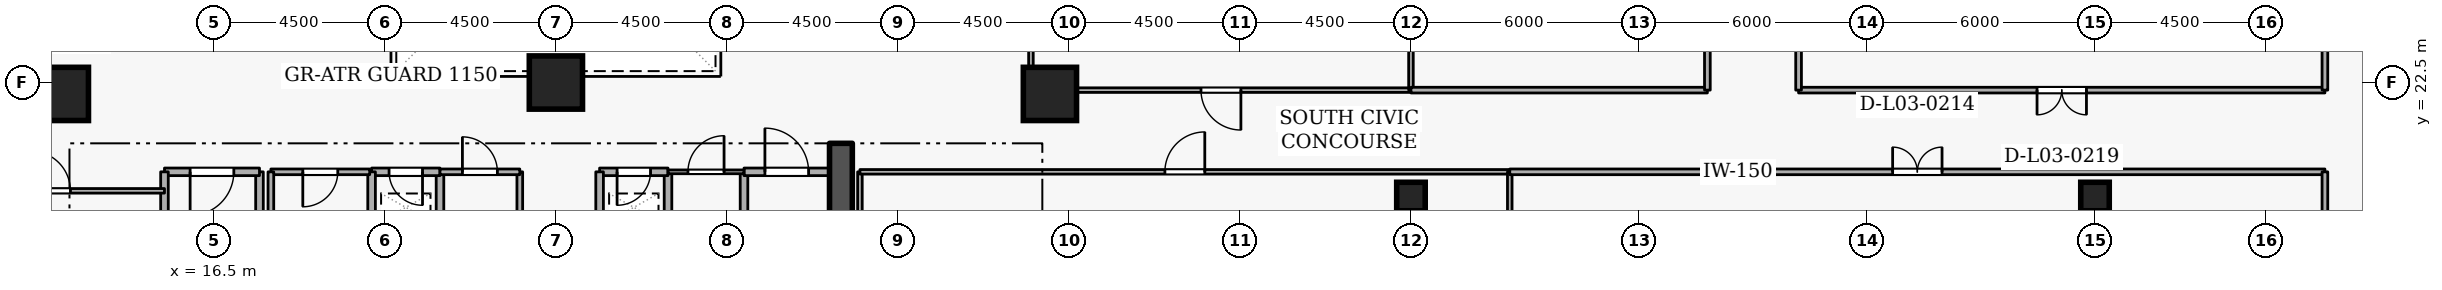
"""IFC4 building model, lengths in metres.
Left out: names, types, materials, properties, quantities, classifications, styles, units other than length and angle.
Written with IfcOpenShell. Run it as: python <this file> out.ifc"""

import sys

from ifc_helpers import new_model, si_unit, direction, frame, frame_2d, origin, origin_2d, place, context, subcontext, project, spatial, rectangle, extrude, element, fill, save


model = new_model("IFC4")
c1 = context("Model", 3, precision=1e-05, world=origin(), true_north=direction((0.0, 1.0)))
c2 = subcontext(c1, "Body", "Model", "MODEL_VIEW")
j1 = project(units=[si_unit("LENGTHUNIT", "METRE"), si_unit("PLANEANGLEUNIT", "RADIAN")], contexts=[c1])
p1 = place(None, origin())
s1 = spatial("IfcSite", under=j1, at=p1, CompositionType="ELEMENT")
p2 = place(p1, origin())
s2 = spatial("IfcBuilding", under=s1, at=p2, CompositionType="ELEMENT")
p3 = place(p2, frame((0.0, 0.0, 14.1)))
s3 = spatial("IfcBuildingStorey", under=s2, at=p3, CompositionType="ELEMENT", Elevation=14.1)
p4 = place(p3, frame((33.0, 15.2, 0.0), z_axis=(0.0, 0.0, 1.0), x_axis=(0.0, 1.0, 0.0)))
e1 = element("IfcWall", 1, at=p4, inside=s3, PredefinedType="SHEAR", context=c2, shape_type="SweptSolid", body=[
    extrude(rectangle(XDim=5.7, YDim=0.6, at=frame_2d((2.85, 0.0))), origin(), (0.0, 0.0, 1.0), 4.5),
])
for number, where, z_axis, x_axis in (
    (2, (12.5, 22.2, 0.0), (0.0, 0.0, 1.0), (1.0, 0.0, 0.0)),
    (3, (38.5, 22.2, 0.0), (0.0, 0.0, 1.0), (1.0, 0.0, 0.0)),
    (4, (25.5, 22.5, 0.0), (0.0, 0.0, 1.0), (1.0, 0.0, 0.0)),
):
    element("IfcColumn", number, at=place(p3, frame(where, z_axis=z_axis, x_axis=x_axis)), inside=s3, PredefinedType="COLUMN", context=c2, shape_type="SweptSolid", body=[
        extrude(rectangle(XDim=1.4, YDim=1.4, at=origin_2d()), origin(), (0.0, 0.0, 1.0), 4.5),
    ])
for number, where, z_axis, x_axis in (
    (5, (48.0, 19.5, 0.0), (0.0, 0.0, 1.0), (1.0, 0.0, 0.0)),
    (6, (66.0, 19.5, 0.0), (0.0, 0.0, 1.0), (1.0, 0.0, 0.0)),
):
    element("IfcColumn", number, at=place(p3, frame(where, z_axis=z_axis, x_axis=x_axis)), inside=s3, PredefinedType="COLUMN", context=c2, shape_type="SweptSolid", body=[
        extrude(rectangle(XDim=0.75, YDim=0.75, at=origin_2d()), origin(), (0.0, 0.0, 1.0), 4.5),
    ])
p5 = place(p3, frame((17.7, 18.4, 0.0), z_axis=(0.0, 0.0, 1.0), x_axis=(0.0, 1.0, 0.0)))
e7 = element("IfcWall", 7, at=p5, inside=s3, PredefinedType="STANDARD", context=c2, shape_type="SweptSolid", body=[
    extrude(rectangle(XDim=1.75, YDim=0.2, at=frame_2d((0.875, 0.0))), origin(), (0.0, 0.0, 1.0), 3.365),
])
p6 = place(p3, frame((17.7, 20.15, 0.0), z_axis=(0.0, 0.0, 1.0), x_axis=(-1.0, 0.0, 0.0)))
e8 = element("IfcWall", 8, at=p6, inside=s3, PredefinedType="STANDARD", context=c2, shape_type="SweptSolid", body=[
    extrude(rectangle(XDim=2.5, YDim=0.2, at=frame_2d((1.25, 0.0))), origin(), (0.0, 0.0, 1.0), 4.16),
])
p7 = place(p6, frame((0.675, 0.0, 0.0)))
e9 = element("IfcOpeningElement", 9, at=p7, cuts=e8, PredefinedType="OPENING", context=c2, shape_type="SweptSolid", body=[
    extrude(rectangle(XDim=1.15, YDim=2.1, at=frame_2d((0.575, 1.05))), frame((0.0, 0.11, 0.0), z_axis=(0.0, -1.0, 0.0), x_axis=(1.0, 0.0, 0.0)), (0.0, 0.0, 1.0), 0.22),
])
p8 = place(p3, frame((15.2, 20.15, 0.0), z_axis=(0.0, 0.0, 1.0), x_axis=(0.0, -1.0, 0.0)))
e10 = element("IfcWall", 10, at=p8, inside=s3, PredefinedType="STANDARD", context=c2, shape_type="SweptSolid", body=[
    extrude(rectangle(XDim=5.15, YDim=0.2, at=frame_2d((2.575, 0.0))), origin(), (0.0, 0.0, 1.0), 4.16),
])
p9 = place(p3, frame((28.45, 18.65, 0.0), z_axis=(0.0, 0.0, 1.0), x_axis=(0.0, 1.0, 0.0)))
e11 = element("IfcWall", 11, at=p9, inside=s3, PredefinedType="STANDARD", context=c2, shape_type="SweptSolid", body=[
    extrude(rectangle(XDim=1.5, YDim=0.2, at=frame_2d((0.75, 0.0))), origin(), (0.0, 0.0, 1.0), 4.16),
])
p10 = place(p3, frame((28.45, 20.15, 0.0), z_axis=(0.0, 0.0, 1.0), x_axis=(-1.0, 0.0, 0.0)))
e12 = element("IfcWall", 12, at=p10, inside=s3, PredefinedType="STANDARD", context=c2, shape_type="SweptSolid", body=[
    extrude(rectangle(XDim=1.8, YDim=0.2, at=frame_2d((0.9, 0.0))), origin(), (0.0, 0.0, 1.0), 4.16),
])
p11 = place(p10, frame((0.46, 0.0, 0.0)))
e13 = element("IfcOpeningElement", 13, at=p11, cuts=e12, PredefinedType="OPENING", context=c2, shape_type="SweptSolid", body=[
    extrude(rectangle(XDim=0.88, YDim=2.04, at=frame_2d((0.44, 1.02))), frame((0.0, 0.11, 0.0), z_axis=(0.0, -1.0, 0.0), x_axis=(1.0, 0.0, 0.0)), (0.0, 0.0, 1.0), 0.22),
])
for number, where, z_axis, x_axis in (
    (14, (26.65, 20.15, 0.0), (0.0, 0.0, 1.0), (0.0, -1.0, 0.0)),
    (15, (22.45, 18.65, 0.0), (0.0, 0.0, 1.0), (0.0, 1.0, 0.0)),
):
    element("IfcWall", number, at=place(p3, frame(where, z_axis=z_axis, x_axis=x_axis)), inside=s3, PredefinedType="STANDARD", context=c2, shape_type="SweptSolid", body=[
        extrude(rectangle(XDim=1.5, YDim=0.2, at=frame_2d((0.75, 0.0))), origin(), (0.0, 0.0, 1.0), 4.16),
    ])
p12 = place(p3, frame((22.45, 20.15, 0.0), z_axis=(0.0, 0.0, 1.0), x_axis=(-1.0, 0.0, 0.0)))
e16 = element("IfcWall", 16, at=p12, inside=s3, PredefinedType="STANDARD", context=c2, shape_type="SweptSolid", body=[
    extrude(rectangle(XDim=1.8, YDim=0.2, at=frame_2d((0.9, 0.0))), origin(), (0.0, 0.0, 1.0), 4.16),
])
p13 = place(p12, frame((0.46, 0.0, 0.0)))
e17 = element("IfcOpeningElement", 17, at=p13, cuts=e16, PredefinedType="OPENING", context=c2, shape_type="SweptSolid", body=[
    extrude(rectangle(XDim=0.88, YDim=2.04, at=frame_2d((0.44, 1.02))), frame((0.0, 0.11, 0.0), z_axis=(0.0, -1.0, 0.0), x_axis=(1.0, 0.0, 0.0)), (0.0, 0.0, 1.0), 0.22),
])
for number, where, z_axis, x_axis in (
    (18, (20.65, 20.15, 0.0), (0.0, 0.0, 1.0), (0.0, -1.0, 0.0)),
    (19, (30.45, 18.65, 0.0), (0.0, 0.0, 1.0), (0.0, 1.0, 0.0)),
):
    element("IfcWall", number, at=place(p3, frame(where, z_axis=z_axis, x_axis=x_axis)), inside=s3, PredefinedType="STANDARD", context=c2, shape_type="SweptSolid", body=[
        extrude(rectangle(XDim=1.5, YDim=0.2, at=frame_2d((0.75, 0.0))), origin(), (0.0, 0.0, 1.0), 4.16),
    ])
p14 = place(p3, frame((30.45, 20.15, 0.0), z_axis=(0.0, 0.0, 1.0), x_axis=(1.0, 0.0, 0.0)))
e20 = element("IfcWall", 20, at=p14, inside=s3, PredefinedType="STANDARD", context=c2, shape_type="SweptSolid", body=[
    extrude(rectangle(XDim=2.25, YDim=0.2, at=frame_2d((1.125, 0.0))), origin(), (0.0, 0.0, 1.0), 4.16),
])
p15 = place(p14, frame((0.55, 0.0, 0.0)))
e21 = element("IfcOpeningElement", 21, at=p15, cuts=e20, PredefinedType="OPENING", context=c2, shape_type="SweptSolid", body=[
    extrude(rectangle(XDim=1.15, YDim=2.1, at=frame_2d((0.575, 1.05))), frame((0.0, 0.11, 0.0), z_axis=(0.0, -1.0, 0.0), x_axis=(1.0, 0.0, 0.0)), (0.0, 0.0, 1.0), 0.22),
])
p16 = place(p3, frame((20.6, 20.15, 0.0), z_axis=(0.0, 0.0, 1.0), x_axis=(-1.0, 0.0, 0.0)))
e22 = element("IfcWall", 22, at=p16, inside=s3, PredefinedType="PARTITIONING", context=c2, shape_type="SweptSolid", body=[
    extrude(rectangle(XDim=2.6, YDim=0.15, at=frame_2d((1.3, 0.0))), origin(), (0.0, 0.0, 1.0), 4.16),
])
p17 = place(p16, frame((0.84, 0.0, 0.0)))
e23 = element("IfcOpeningElement", 23, at=p17, cuts=e22, PredefinedType="OPENING", context=c2, shape_type="SweptSolid", body=[
    extrude(rectangle(XDim=0.92, YDim=2.08, at=frame_2d((0.46, 1.04))), frame((0.0, 0.085, 0.0), z_axis=(0.0, -1.0, 0.0), x_axis=(1.0, 0.0, 0.0)), (0.0, 0.0, 1.0), 0.17),
])
p18 = place(p3, frame((18.0, 20.15, 0.0), z_axis=(0.0, 0.0, 1.0), x_axis=(0.0, -1.0, 0.0)))
e24 = element("IfcWall", 24, at=p18, inside=s3, PredefinedType="PARTITIONING", context=c2, shape_type="SweptSolid", body=[
    extrude(rectangle(XDim=1.5, YDim=0.15, at=frame_2d((0.75, 0.0))), origin(), (0.0, 0.0, 1.0), 3.365),
])
p19 = place(p3, frame((24.55, 20.15, 0.0), z_axis=(0.0, 0.0, 1.0), x_axis=(0.0, -1.0, 0.0)))
e25 = element("IfcWall", 25, at=p19, inside=s3, PredefinedType="PARTITIONING", context=c2, shape_type="SweptSolid", body=[
    extrude(rectangle(XDim=1.5, YDim=0.15, at=frame_2d((0.75, 0.0))), origin(), (0.0, 0.0, 1.0), 4.16),
])
p20 = place(p3, frame((22.45, 20.15, 0.0), z_axis=(0.0, 0.0, 1.0), x_axis=(1.0, 0.0, 0.0)))
e26 = element("IfcWall", 26, at=p20, inside=s3, PredefinedType="PARTITIONING", context=c2, shape_type="SweptSolid", body=[
    extrude(rectangle(XDim=2.1, YDim=0.15, at=frame_2d((1.05, 0.0))), origin(), (0.0, 0.0, 1.0), 4.16),
])
p21 = place(p20, frame((0.59, 0.0, 0.0)))
e27 = element("IfcOpeningElement", 27, at=p21, cuts=e26, PredefinedType="OPENING", context=c2, shape_type="SweptSolid", body=[
    extrude(rectangle(XDim=0.92, YDim=2.08, at=frame_2d((0.46, 1.04))), frame((0.0, 0.085, 0.0), z_axis=(0.0, -1.0, 0.0), x_axis=(1.0, 0.0, 0.0)), (0.0, 0.0, 1.0), 0.17),
])
p22 = place(p3, frame((28.45, 20.15, 0.0), z_axis=(0.0, 0.0, 1.0), x_axis=(1.0, 0.0, 0.0)))
e28 = element("IfcWall", 28, at=p22, inside=s3, PredefinedType="PARTITIONING", context=c2, shape_type="SweptSolid", body=[
    extrude(rectangle(XDim=2.0, YDim=0.1, at=frame_2d((1.0, 0.0))), origin(), (0.0, 0.0, 1.0), 4.16),
])
p23 = place(p22, frame((0.525, 0.0, 0.0)))
e29 = element("IfcOpeningElement", 29, at=p23, cuts=e28, PredefinedType="OPENING", context=c2, shape_type="SweptSolid", body=[
    extrude(rectangle(XDim=0.95, YDim=2.1, at=frame_2d((0.475, 1.05))), frame((0.0, 0.06, 0.0), z_axis=(0.0, -1.0, 0.0), x_axis=(1.0, 0.0, 0.0)), (0.0, 0.0, 1.0), 0.12),
])
p24 = place(p3, frame((9.2, 19.65, 0.0), z_axis=(0.0, 0.0, 1.0), x_axis=(1.0, 0.0, 0.0)))
e30 = element("IfcWall", 30, at=p24, inside=s3, PredefinedType="PARTITIONING", context=c2, shape_type="SweptSolid", body=[
    extrude(rectangle(XDim=6.0, YDim=0.12, at=frame_2d((3.0, 0.0))), origin(), (0.0, 0.0, 1.0), 4.16),
])
p25 = place(p24, frame((2.475, 0.0, 0.0)))
e31 = element("IfcOpeningElement", 31, at=p25, cuts=e30, PredefinedType="OPENING", context=c2, shape_type="SweptSolid", body=[
    extrude(rectangle(XDim=1.05, YDim=2.1, at=frame_2d((0.525, 1.05))), frame((0.0, 0.07, 0.0), z_axis=(0.0, -1.0, 0.0), x_axis=(1.0, 0.0, 0.0)), (0.0, 0.0, 1.0), 0.14),
])
p26 = place(p3, frame((33.5, 17.648, 0.0), z_axis=(0.0, 0.0, 1.0), x_axis=(0.0, 1.0, 0.0)))
e32 = element("IfcWall", 32, at=p26, inside=s3, PredefinedType="PARTITIONING", context=c2, shape_type="SweptSolid", body=[
    extrude(rectangle(XDim=2.502, YDim=0.12, at=frame_2d((1.251, 0.0))), origin(), (0.0, 0.0, 1.0), 4.16),
])
p27 = place(p3, frame((33.5, 20.15, 0.0), z_axis=(0.0, 0.0, 1.0), x_axis=(1.0, 0.0, 0.0)))
e33 = element("IfcWall", 33, at=p27, inside=s3, PredefinedType="PARTITIONING", context=c2, shape_type="SweptSolid", body=[
    extrude(rectangle(XDim=17.1, YDim=0.12, at=frame_2d((8.55, 0.0))), origin(), (0.0, 0.0, 1.0), 4.16),
])
p28 = place(p27, frame((8.025, 0.0, 0.0)))
e34 = element("IfcOpeningElement", 34, at=p28, cuts=e33, PredefinedType="OPENING", context=c2, shape_type="SweptSolid", body=[
    extrude(rectangle(XDim=1.05, YDim=2.1, at=frame_2d((0.525, 1.05))), frame((0.0, 0.07, 0.0), z_axis=(0.0, -1.0, 0.0), x_axis=(1.0, 0.0, 0.0)), (0.0, 0.0, 1.0), 0.14),
])
p29 = place(p3, frame((50.6, 20.15, 0.0), z_axis=(0.0, 0.0, 1.0), x_axis=(0.0, -1.0, 0.0)))
e35 = element("IfcWall", 35, at=p29, inside=s3, PredefinedType="PARTITIONING", context=c2, shape_type="SweptSolid", body=[
    extrude(rectangle(XDim=10.83, YDim=0.12, at=frame_2d((5.415, 0.0))), origin(), (0.0, 0.0, 1.0), 4.16),
])
p30 = place(p3, frame((50.6, 20.15, 0.0), z_axis=(0.0, 0.0, 1.0), x_axis=(1.0, 0.0, 0.0)))
e36 = element("IfcWall", 36, at=p30, inside=s3, PredefinedType="PARTITIONING", context=c2, shape_type="SweptSolid", body=[
    extrude(rectangle(XDim=21.45, YDim=0.15, at=frame_2d((10.725, 0.0))), origin(), (0.0, 0.0, 1.0), 4.16),
])
p31 = place(p30, frame((10.075, 0.0, 0.0)))
e37 = element("IfcOpeningElement", 37, at=p31, cuts=e36, PredefinedType="OPENING", context=c2, shape_type="SweptSolid", body=[
    extrude(rectangle(XDim=1.3, YDim=2.12, at=frame_2d((0.65, 1.06))), frame((0.0, 0.085, 0.0), z_axis=(0.0, -1.0, 0.0), x_axis=(1.0, 0.0, 0.0)), (0.0, 0.0, 1.0), 0.17),
])
p32 = place(p3, frame((72.05, 20.15, 0.0), z_axis=(0.0, 0.0, 1.0), x_axis=(0.0, -1.0, 0.0)))
e38 = element("IfcWall", 38, at=p32, inside=s3, PredefinedType="PARTITIONING", context=c2, shape_type="SweptSolid", body=[
    extrude(rectangle(XDim=5.35, YDim=0.15, at=frame_2d((2.675, 0.0))), origin(), (0.0, 0.0, 1.0), 4.16),
])
p33 = place(p3, frame((48.0, 22.3, 0.0), z_axis=(0.0, 0.0, 1.0), x_axis=(-1.0, 0.0, 0.0)))
e39 = element("IfcWall", 39, at=p33, inside=s3, PredefinedType="PARTITIONING", context=c2, shape_type="SweptSolid", body=[
    extrude(rectangle(XDim=10.0, YDim=0.12, at=frame_2d((5.0, 0.0))), origin(), (0.0, 0.0, 1.0), 4.16),
])
p34 = place(p33, frame((4.475, 0.0, 0.0)))
e40 = element("IfcOpeningElement", 40, at=p34, cuts=e39, PredefinedType="OPENING", context=c2, shape_type="SweptSolid", body=[
    extrude(rectangle(XDim=1.05, YDim=2.1, at=frame_2d((0.525, 1.05))), frame((0.0, 0.07, 0.0), z_axis=(0.0, -1.0, 0.0), x_axis=(1.0, 0.0, 0.0)), (0.0, 0.0, 1.0), 0.14),
])
p35 = place(p3, frame((38.0, 22.3, 0.0), z_axis=(0.0, 0.0, 1.0), x_axis=(0.0, 1.0, 0.0)))
e41 = element("IfcWall", 41, at=p35, inside=s3, PredefinedType="PARTITIONING", context=c2, shape_type="SweptSolid", body=[
    extrude(rectangle(XDim=9.98, YDim=0.12, at=frame_2d((4.99, 0.0))), origin(), (0.0, 0.0, 1.0), 4.16),
])
p36 = place(p3, frame((48.0, 32.28, 0.0), z_axis=(0.0, 0.0, 1.0), x_axis=(0.0, -1.0, 0.0)))
e42 = element("IfcWall", 42, at=p36, inside=s3, PredefinedType="PARTITIONING", context=c2, shape_type="SweptSolid", body=[
    extrude(rectangle(XDim=9.98, YDim=0.12, at=frame_2d((4.99, 0.0))), origin(), (0.0, 0.0, 1.0), 3.314),
])
p37 = place(p3, frame((72.05, 22.3, 0.0), z_axis=(0.0, 0.0, 1.0), x_axis=(-1.0, 0.0, 0.0)))
e43 = element("IfcWall", 43, at=p37, inside=s3, PredefinedType="PARTITIONING", context=c2, shape_type="SweptSolid", body=[
    extrude(rectangle(XDim=13.85, YDim=0.15, at=frame_2d((6.925, 0.0))), origin(), (0.0, 0.0, 1.0), 4.16),
])
p38 = place(p37, frame((6.275, 0.0, 0.0)))
e44 = element("IfcOpeningElement", 44, at=p38, cuts=e43, PredefinedType="OPENING", context=c2, shape_type="SweptSolid", body=[
    extrude(rectangle(XDim=1.3, YDim=2.12, at=frame_2d((0.65, 1.06))), frame((0.0, 0.085, 0.0), z_axis=(0.0, -1.0, 0.0), x_axis=(1.0, 0.0, 0.0)), (0.0, 0.0, 1.0), 0.17),
])
for number, where, z_axis, x_axis in (
    (45, (58.2, 22.3, 0.0), (0.0, 0.0, 1.0), (0.0, 1.0, 0.0)),
    (46, (72.05, 32.28, 0.0), (0.0, 0.0, 1.0), (0.0, -1.0, 0.0)),
):
    element("IfcWall", number, at=place(p3, frame(where, z_axis=z_axis, x_axis=x_axis)), inside=s3, PredefinedType="PARTITIONING", context=c2, shape_type="SweptSolid", body=[
        extrude(rectangle(XDim=9.98, YDim=0.15, at=frame_2d((4.99, 0.0))), origin(), (0.0, 0.0, 1.0), 4.16),
    ])
p39 = place(p3, frame((55.8, 22.3, 0.0), z_axis=(0.0, 0.0, 1.0), x_axis=(-1.0, 0.0, 0.0)))
e47 = element("IfcWall", 47, at=p39, inside=s3, PredefinedType="PARTITIONING", context=c2, shape_type="SweptSolid", body=[
    extrude(rectangle(XDim=7.8, YDim=0.15, at=frame_2d((3.9, 0.0))), origin(), (0.0, 0.0, 1.0), 4.16),
])
p40 = place(p3, frame((55.8, 32.28, 0.0), z_axis=(0.0, 0.0, 1.0), x_axis=(0.0, -1.0, 0.0)))
e48 = element("IfcWall", 48, at=p40, inside=s3, PredefinedType="PARTITIONING", context=c2, shape_type="SweptSolid", body=[
    extrude(rectangle(XDim=9.98, YDim=0.15, at=frame_2d((4.99, 0.0))), origin(), (0.0, 0.0, 1.0), 4.16),
])
p41 = place(p40, frame((4.34, 0.0, 0.0)))
e49 = element("IfcOpeningElement", 49, at=p41, cuts=e48, PredefinedType="OPENING", context=c2, shape_type="SweptSolid", body=[
    extrude(rectangle(XDim=1.3, YDim=2.12, at=frame_2d((0.65, 1.06))), frame((0.0, 0.085, 0.0), z_axis=(0.0, -1.0, 0.0), x_axis=(1.0, 0.0, 0.0)), (0.0, 0.0, 1.0), 0.17),
])
p42 = place(p7, origin())
e50 = element("IfcDoor", 50, at=p42, inside=s3, OperationType="SINGLE_SWING_RIGHT", PredefinedType="DOOR", context=c2, shape_type="SweptSolid", body=[
    extrude(rectangle(XDim=1.15, YDim=2.1, at=frame_2d((0.575, 1.05))), frame((0.0, 0.025, 0.0), z_axis=(0.0, -1.0, 0.0), x_axis=(1.0, 0.0, 0.0)), (0.0, 0.0, 1.0), 0.05),
])
fill(e9, e50)
p43 = place(p11, origin())
e51 = element("IfcDoor", 51, at=p43, inside=s3, OperationType="SINGLE_SWING_RIGHT", PredefinedType="DOOR", context=c2, shape_type="SweptSolid", body=[
    extrude(rectangle(XDim=0.88, YDim=2.04, at=frame_2d((0.44, 1.02))), frame((0.0, 0.025, 0.0), z_axis=(0.0, -1.0, 0.0), x_axis=(1.0, 0.0, 0.0)), (0.0, 0.0, 1.0), 0.05),
])
fill(e13, e51)
p44 = place(p13, origin())
e52 = element("IfcDoor", 52, at=p44, inside=s3, OperationType="SINGLE_SWING_LEFT", PredefinedType="DOOR", context=c2, shape_type="SweptSolid", body=[
    extrude(rectangle(XDim=0.88, YDim=2.04, at=frame_2d((0.44, 1.02))), frame((0.0, 0.025, 0.0), z_axis=(0.0, -1.0, 0.0), x_axis=(1.0, 0.0, 0.0)), (0.0, 0.0, 1.0), 0.05),
])
fill(e17, e52)
p45 = place(p17, origin())
e53 = element("IfcDoor", 53, at=p45, inside=s3, OperationType="SINGLE_SWING_RIGHT", PredefinedType="DOOR", context=c2, shape_type="SweptSolid", body=[
    extrude(rectangle(XDim=0.92, YDim=2.08, at=frame_2d((0.46, 1.04))), frame((0.0, 0.025, 0.0), z_axis=(0.0, -1.0, 0.0), x_axis=(1.0, 0.0, 0.0)), (0.0, 0.0, 1.0), 0.05),
])
fill(e23, e53)
p46 = place(p21, origin())
e54 = element("IfcDoor", 54, at=p46, inside=s3, OperationType="SINGLE_SWING_LEFT", PredefinedType="DOOR", context=c2, shape_type="SweptSolid", body=[
    extrude(rectangle(XDim=0.92, YDim=2.08, at=frame_2d((0.46, 1.04))), frame((0.0, 0.025, 0.0), z_axis=(0.0, -1.0, 0.0), x_axis=(1.0, 0.0, 0.0)), (0.0, 0.0, 1.0), 0.05),
])
fill(e27, e54)
p47 = place(p23, origin())
e55 = element("IfcDoor", 55, at=p47, inside=s3, OperationType="SINGLE_SWING_RIGHT", PredefinedType="DOOR", context=c2, shape_type="SweptSolid", body=[
    extrude(rectangle(XDim=0.95, YDim=2.1, at=frame_2d((0.475, 1.05))), frame((0.0, 0.025, 0.0), z_axis=(0.0, -1.0, 0.0), x_axis=(1.0, 0.0, 0.0)), (0.0, 0.0, 1.0), 0.05),
])
fill(e29, e55)
p48 = place(p15, origin())
e56 = element("IfcDoor", 56, at=p48, inside=s3, OperationType="SINGLE_SWING_LEFT", PredefinedType="DOOR", context=c2, shape_type="SweptSolid", body=[
    extrude(rectangle(XDim=1.15, YDim=2.1, at=frame_2d((0.575, 1.05))), frame((0.0, 0.025, 0.0), z_axis=(0.0, -1.0, 0.0), x_axis=(1.0, 0.0, 0.0)), (0.0, 0.0, 1.0), 0.05),
])
fill(e21, e56)
p49 = place(p25, origin())
e57 = element("IfcDoor", 57, at=p49, inside=s3, OperationType="SINGLE_SWING_LEFT", PredefinedType="DOOR", context=c2, shape_type="SweptSolid", body=[
    extrude(rectangle(XDim=1.05, YDim=2.1, at=frame_2d((0.525, 1.05))), frame((0.0, 0.025, 0.0), z_axis=(0.0, -1.0, 0.0), x_axis=(1.0, 0.0, 0.0)), (0.0, 0.0, 1.0), 0.05),
])
fill(e31, e57)
p50 = place(p28, origin())
e58 = element("IfcDoor", 58, at=p50, inside=s3, OperationType="SINGLE_SWING_RIGHT", PredefinedType="DOOR", context=c2, shape_type="SweptSolid", body=[
    extrude(rectangle(XDim=1.05, YDim=2.1, at=frame_2d((0.525, 1.05))), frame((0.0, 0.025, 0.0), z_axis=(0.0, -1.0, 0.0), x_axis=(1.0, 0.0, 0.0)), (0.0, 0.0, 1.0), 0.05),
])
fill(e34, e58)
p51 = place(p31, origin())
e59 = element("IfcDoor", 59, at=p51, inside=s3, OperationType="DOUBLE_DOOR_SINGLE_SWING", PredefinedType="DOOR", context=c2, shape_type="SweptSolid", body=[
    extrude(rectangle(XDim=1.3, YDim=2.12, at=frame_2d((0.65, 1.06))), frame((0.0, 0.025, 0.0), z_axis=(0.0, -1.0, 0.0), x_axis=(1.0, 0.0, 0.0)), (0.0, 0.0, 1.0), 0.05),
])
fill(e37, e59)
p52 = place(p34, origin())
e60 = element("IfcDoor", 60, at=p52, inside=s3, OperationType="SINGLE_SWING_LEFT", PredefinedType="DOOR", context=c2, shape_type="SweptSolid", body=[
    extrude(rectangle(XDim=1.05, YDim=2.1, at=frame_2d((0.525, 1.05))), frame((0.0, 0.025, 0.0), z_axis=(0.0, -1.0, 0.0), x_axis=(1.0, 0.0, 0.0)), (0.0, 0.0, 1.0), 0.05),
])
fill(e40, e60)
p53 = place(p38, origin())
e61 = element("IfcDoor", 61, at=p53, inside=s3, OperationType="DOUBLE_DOOR_SINGLE_SWING", PredefinedType="DOOR", context=c2, shape_type="SweptSolid", body=[
    extrude(rectangle(XDim=1.3, YDim=2.12, at=frame_2d((0.65, 1.06))), frame((0.0, 0.025, 0.0), z_axis=(0.0, -1.0, 0.0), x_axis=(1.0, 0.0, 0.0)), (0.0, 0.0, 1.0), 0.05),
])
fill(e44, e61)
save(model, sys.argv[1])
